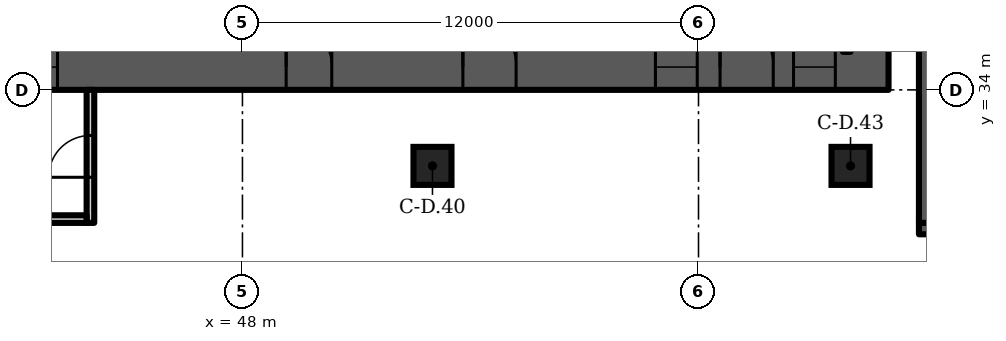
"""IFC4 building model, lengths in metres.
Left out: names, types, materials, properties, quantities, classifications, styles, units other than length and angle.
Written with IfcOpenShell. Run it as: python <this file> out.ifc"""

import sys

from ifc_helpers import new_model, si_unit, direction, frame, frame_2d, origin, origin_2d, place, context, subcontext, project, spatial, rectangle, extrude, element, fill, save


model = new_model("IFC4")
c1 = context("Model", 3, precision=1e-05, world=origin(), true_north=direction((0.0, 1.0)))
c2 = subcontext(c1, "Body", "Model", "MODEL_VIEW")
j1 = project(units=[si_unit("LENGTHUNIT", "METRE"), si_unit("PLANEANGLEUNIT", "RADIAN")], contexts=[c1])
p1 = place(None, origin())
s1 = spatial("IfcSite", under=j1, at=p1, CompositionType="ELEMENT")
p2 = place(p1, origin())
s2 = spatial("IfcBuilding", under=s1, at=p2, CompositionType="ELEMENT")
p3 = place(p2, frame((0.0, 0.0, 27.5)))
s3 = spatial("IfcBuildingStorey", under=s2, at=p3, CompositionType="ELEMENT", Elevation=27.5)
for number, where, z_axis, x_axis in (
    (1, (53.0, 32.0, 0.0), (0.0, 0.0, 1.0), (1.0, 0.0, 0.0)),
    (2, (64.0, 32.0, 0.0), (0.0, 0.0, 1.0), (1.0, 0.0, 0.0)),
):
    element("IfcColumn", number, at=place(p3, frame(where, z_axis=z_axis, x_axis=x_axis)), inside=s3, PredefinedType="COLUMN", context=c2, shape_type="SweptSolid", body=[
        extrude(rectangle(XDim=1.0, YDim=1.0, at=origin_2d()), origin(), (0.0, 0.0, 1.0), 5.5),
    ])
p4 = place(p3, frame((9.0, 34.6, 0.0), z_axis=(0.0, 0.0, 1.0), x_axis=(1.0, 0.0, 0.0)))
e3 = element("IfcWall", 3, at=p4, inside=s3, PredefinedType="SHEAR", context=c2, shape_type="SweptSolid", body=[
    extrude(rectangle(XDim=56.0, YDim=1.2, at=frame_2d((28.0, 0.0))), origin(), (0.0, 0.0, 1.0), 5.2),
])
p5 = place(p4, frame((3.3, 0.0, 0.0)))
e4 = element("IfcOpeningElement", 4, at=p5, cuts=e3, PredefinedType="OPENING", context=c2, shape_type="SweptSolid", body=[
    extrude(rectangle(XDim=1.0, YDim=2.1, at=frame_2d((0.5, 1.05))), frame((0.0, 0.61, 0.0), z_axis=(0.0, -1.0, 0.0), x_axis=(1.0, 0.0, 0.0)), (0.0, 0.0, 1.0), 1.22),
])
p6 = place(p4, frame((7.867, 0.0, 0.0)))
e5 = element("IfcOpeningElement", 5, at=p6, cuts=e3, PredefinedType="OPENING", context=c2, shape_type="SweptSolid", body=[
    extrude(rectangle(XDim=1.1, YDim=2.1, at=frame_2d((0.55, 1.05))), frame((0.0, 0.61, 0.0), z_axis=(0.0, -1.0, 0.0), x_axis=(1.0, 0.0, 0.0)), (0.0, 0.0, 1.0), 1.22),
])
p7 = place(p4, frame((12.033, 0.0, 0.0)))
e6 = element("IfcOpeningElement", 6, at=p7, cuts=e3, PredefinedType="OPENING", context=c2, shape_type="SweptSolid", body=[
    extrude(rectangle(XDim=1.1, YDim=2.1, at=frame_2d((0.55, 1.05))), frame((0.0, 0.61, 0.0), z_axis=(0.0, -1.0, 0.0), x_axis=(1.0, 0.0, 0.0)), (0.0, 0.0, 1.0), 1.22),
])
p8 = place(p4, frame((9.8, 0.0, 0.0)))
e7 = element("IfcOpeningElement", 7, at=p8, cuts=e3, PredefinedType="OPENING", context=c2, shape_type="SweptSolid", body=[
    extrude(rectangle(XDim=1.4, YDim=2.1, at=frame_2d((0.7, 1.05))), frame((0.0, 0.61, 0.0), z_axis=(0.0, -1.0, 0.0), x_axis=(1.0, 0.0, 0.0)), (0.0, 0.0, 1.0), 1.22),
])
p9 = place(p4, frame((14.65, 0.0, 0.0)))
e8 = element("IfcOpeningElement", 8, at=p9, cuts=e3, PredefinedType="OPENING", context=c2, shape_type="SweptSolid", body=[
    extrude(rectangle(XDim=1.2, YDim=2.1, at=frame_2d((0.6, 1.05))), frame((0.0, 0.61, 0.0), z_axis=(0.0, -1.0, 0.0), x_axis=(1.0, 0.0, 0.0)), (0.0, 0.0, 1.0), 1.22),
])
p10 = place(p4, frame((21.867, 0.0, 0.0)))
e9 = element("IfcOpeningElement", 9, at=p10, cuts=e3, PredefinedType="OPENING", context=c2, shape_type="SweptSolid", body=[
    extrude(rectangle(XDim=1.1, YDim=2.1, at=frame_2d((0.55, 1.05))), frame((0.0, 0.61, 0.0), z_axis=(0.0, -1.0, 0.0), x_axis=(1.0, 0.0, 0.0)), (0.0, 0.0, 1.0), 1.22),
])
p11 = place(p4, frame((26.033, 0.0, 0.0)))
e10 = element("IfcOpeningElement", 10, at=p11, cuts=e3, PredefinedType="OPENING", context=c2, shape_type="SweptSolid", body=[
    extrude(rectangle(XDim=1.1, YDim=2.1, at=frame_2d((0.55, 1.05))), frame((0.0, 0.61, 0.0), z_axis=(0.0, -1.0, 0.0), x_axis=(1.0, 0.0, 0.0)), (0.0, 0.0, 1.0), 1.22),
])
p12 = place(p4, frame((23.8, 0.0, 0.0)))
e11 = element("IfcOpeningElement", 11, at=p12, cuts=e3, PredefinedType="OPENING", context=c2, shape_type="SweptSolid", body=[
    extrude(rectangle(XDim=1.4, YDim=2.1, at=frame_2d((0.7, 1.05))), frame((0.0, 0.61, 0.0), z_axis=(0.0, -1.0, 0.0), x_axis=(1.0, 0.0, 0.0)), (0.0, 0.0, 1.0), 1.22),
])
p13 = place(p4, frame((28.867, 0.0, 0.0)))
e12 = element("IfcOpeningElement", 12, at=p13, cuts=e3, PredefinedType="OPENING", context=c2, shape_type="SweptSolid", body=[
    extrude(rectangle(XDim=1.1, YDim=2.1, at=frame_2d((0.55, 1.05))), frame((0.0, 0.61, 0.0), z_axis=(0.0, -1.0, 0.0), x_axis=(1.0, 0.0, 0.0)), (0.0, 0.0, 1.0), 1.22),
])
p14 = place(p4, frame((33.033, 0.0, 0.0)))
e13 = element("IfcOpeningElement", 13, at=p14, cuts=e3, PredefinedType="OPENING", context=c2, shape_type="SweptSolid", body=[
    extrude(rectangle(XDim=1.1, YDim=2.1, at=frame_2d((0.55, 1.05))), frame((0.0, 0.61, 0.0), z_axis=(0.0, -1.0, 0.0), x_axis=(1.0, 0.0, 0.0)), (0.0, 0.0, 1.0), 1.22),
])
p15 = place(p4, frame((40.15, 0.0, 0.0)))
e14 = element("IfcOpeningElement", 14, at=p15, cuts=e3, PredefinedType="OPENING", context=c2, shape_type="SweptSolid", body=[
    extrude(rectangle(XDim=1.2, YDim=2.1, at=frame_2d((0.6, 1.05))), frame((0.0, 0.61, 0.0), z_axis=(0.0, -1.0, 0.0), x_axis=(1.0, 0.0, 0.0)), (0.0, 0.0, 1.0), 1.22),
])
p16 = place(p4, frame((44.8, 0.0, 0.0)))
e15 = element("IfcOpeningElement", 15, at=p16, cuts=e3, PredefinedType="OPENING", context=c2, shape_type="SweptSolid", body=[
    extrude(rectangle(XDim=1.4, YDim=2.1, at=frame_2d((0.7, 1.05))), frame((0.0, 0.61, 0.0), z_axis=(0.0, -1.0, 0.0), x_axis=(1.0, 0.0, 0.0)), (0.0, 0.0, 1.0), 1.22),
])
p17 = place(p4, frame((49.867, 0.0, 0.0)))
e16 = element("IfcOpeningElement", 16, at=p17, cuts=e3, PredefinedType="OPENING", context=c2, shape_type="SweptSolid", body=[
    extrude(rectangle(XDim=1.1, YDim=2.1, at=frame_2d((0.55, 1.05))), frame((0.0, 0.61, 0.0), z_axis=(0.0, -1.0, 0.0), x_axis=(1.0, 0.0, 0.0)), (0.0, 0.0, 1.0), 1.22),
])
p18 = place(p4, frame((53.5, 0.0, 0.0)))
e17 = element("IfcOpeningElement", 17, at=p18, cuts=e3, PredefinedType="OPENING", context=c2, shape_type="SweptSolid", body=[
    extrude(rectangle(XDim=1.1, YDim=2.1, at=frame_2d((0.55, 1.05))), frame((0.0, 0.61, 0.0), z_axis=(0.0, -1.0, 0.0), x_axis=(1.0, 0.0, 0.0)), (0.0, 0.0, 1.0), 1.22),
])
p19 = place(p4, frame((51.567, 0.0, 0.0)))
e18 = element("IfcOpeningElement", 18, at=p19, cuts=e3, PredefinedType="OPENING", context=c2, shape_type="SweptSolid", body=[
    extrude(rectangle(XDim=1.4, YDim=2.1, at=frame_2d((0.7, 1.05))), frame((0.0, 0.61, 0.0), z_axis=(0.0, -1.0, 0.0), x_axis=(1.0, 0.0, 0.0)), (0.0, 0.0, 1.0), 1.22),
])
p20 = place(p3, frame((44.0, 30.5, 0.0), z_axis=(0.0, 0.0, 1.0), x_axis=(0.0, 1.0, 0.0)))
e19 = element("IfcWall", 19, at=p20, inside=s3, PredefinedType="PARTITIONING", context=c2, shape_type="SweptSolid", body=[
    extrude(rectangle(XDim=3.5, YDim=0.2, at=frame_2d((1.75, 0.0))), origin(), (0.0, 0.0, 1.0), 5.2),
])
p21 = place(p20, frame((1.2, 0.0, 0.0)))
e20 = element("IfcOpeningElement", 20, at=p21, cuts=e19, PredefinedType="OPENING", context=c2, shape_type="SweptSolid", body=[
    extrude(rectangle(XDim=1.1, YDim=2.1, at=frame_2d((0.55, 1.05))), frame((0.0, 0.11, 0.0), z_axis=(0.0, -1.0, 0.0), x_axis=(1.0, 0.0, 0.0)), (0.0, 0.0, 1.0), 0.22),
])
p22 = place(p3, frame((41.1, 30.6, 0.0), z_axis=(0.0, 0.0, 1.0), x_axis=(1.0, 0.0, 0.0)))
e21 = element("IfcWall", 21, at=p22, inside=s3, PredefinedType="PARTITIONING", context=c2, shape_type="SweptSolid", body=[
    extrude(rectangle(XDim=2.8, YDim=0.2, at=frame_2d((1.4, 0.0))), origin(), (0.0, 0.0, 1.0), 5.2),
])
p23 = place(p3, frame((65.8, 30.35, 0.0), z_axis=(0.0, 0.0, 1.0), x_axis=(1.0, 0.0, 0.0)))
e22 = element("IfcWall", 22, at=p23, inside=s3, PredefinedType="SHEAR", context=c2, shape_type="SweptSolid", body=[
    extrude(rectangle(XDim=5.55, YDim=0.3, at=frame_2d((2.775, 0.0))), origin(), (0.0, 0.0, 1.0), 5.2),
])
p24 = place(p23, frame((1.575, 0.0, 0.0)))
e23 = element("IfcOpeningElement", 23, at=p24, cuts=e22, PredefinedType="OPENING", context=c2, shape_type="SweptSolid", body=[
    extrude(rectangle(XDim=2.4, YDim=2.1, at=frame_2d((1.2, 1.05))), frame((0.0, 0.16, 0.0), z_axis=(0.0, -1.0, 0.0), x_axis=(1.0, 0.0, 0.0)), (0.0, 0.0, 1.0), 0.32),
])
p25 = place(p3, frame((65.95, 30.5, 0.0), z_axis=(0.0, 0.0, 1.0), x_axis=(0.0, 1.0, 0.0)))
e24 = element("IfcWall", 24, at=p25, inside=s3, PredefinedType="SHEAR", context=c2, shape_type="SweptSolid", body=[
    extrude(rectangle(XDim=8.4, YDim=0.3, at=frame_2d((4.2, 0.0))), origin(), (0.0, 0.0, 1.0), 5.2),
])
p26 = place(p14, origin())
e25 = element("IfcDoor", 25, at=p26, inside=s3, OperationType="DOUBLE_DOOR_SLIDING", PredefinedType="DOOR", context=c2, shape_type="SweptSolid", body=[
    extrude(rectangle(XDim=1.1, YDim=2.1, at=frame_2d((0.55, 1.05))), frame((0.0, 0.025, 0.0), z_axis=(0.0, -1.0, 0.0), x_axis=(1.0, 0.0, 0.0)), (0.0, 0.0, 1.0), 0.05),
])
fill(e13, e25)
p27 = place(p15, origin())
e26 = element("IfcDoor", 26, at=p27, inside=s3, OperationType="SINGLE_SWING_LEFT", PredefinedType="DOOR", context=c2, shape_type="SweptSolid", body=[
    extrude(rectangle(XDim=1.2, YDim=2.1, at=frame_2d((0.6, 1.05))), frame((0.0, 0.025, 0.0), z_axis=(0.0, -1.0, 0.0), x_axis=(1.0, 0.0, 0.0)), (0.0, 0.0, 1.0), 0.05),
])
fill(e14, e26)
p28 = place(p16, origin())
e27 = element("IfcDoor", 27, at=p28, inside=s3, OperationType="DOUBLE_DOOR_SINGLE_SWING", PredefinedType="DOOR", context=c2, shape_type="SweptSolid", body=[
    extrude(rectangle(XDim=1.4, YDim=2.1, at=frame_2d((0.7, 1.05))), frame((0.0, 0.025, 0.0), z_axis=(0.0, -1.0, 0.0), x_axis=(1.0, 0.0, 0.0)), (0.0, 0.0, 1.0), 0.05),
])
fill(e15, e27)
p29 = place(p17, origin())
e28 = element("IfcDoor", 28, at=p29, inside=s3, OperationType="DOUBLE_DOOR_SLIDING", PredefinedType="DOOR", context=c2, shape_type="SweptSolid", body=[
    extrude(rectangle(XDim=1.1, YDim=2.1, at=frame_2d((0.55, 1.05))), frame((0.0, 0.025, 0.0), z_axis=(0.0, -1.0, 0.0), x_axis=(1.0, 0.0, 0.0)), (0.0, 0.0, 1.0), 0.05),
])
fill(e16, e28)
p30 = place(p18, origin())
e29 = element("IfcDoor", 29, at=p30, inside=s3, OperationType="DOUBLE_DOOR_SLIDING", PredefinedType="DOOR", context=c2, shape_type="SweptSolid", body=[
    extrude(rectangle(XDim=1.1, YDim=2.1, at=frame_2d((0.55, 1.05))), frame((0.0, 0.025, 0.0), z_axis=(0.0, -1.0, 0.0), x_axis=(1.0, 0.0, 0.0)), (0.0, 0.0, 1.0), 0.05),
])
fill(e17, e29)
p31 = place(p19, origin())
e30 = element("IfcDoor", 30, at=p31, inside=s3, OperationType="DOUBLE_DOOR_SINGLE_SWING", PredefinedType="DOOR", context=c2, shape_type="SweptSolid", body=[
    extrude(rectangle(XDim=1.4, YDim=2.1, at=frame_2d((0.7, 1.05))), frame((0.0, 0.025, 0.0), z_axis=(0.0, -1.0, 0.0), x_axis=(1.0, 0.0, 0.0)), (0.0, 0.0, 1.0), 0.05),
])
fill(e18, e30)
p32 = place(p21, origin())
e31 = element("IfcDoor", 31, at=p32, inside=s3, OperationType="SINGLE_SWING_LEFT", PredefinedType="DOOR", context=c2, shape_type="SweptSolid", body=[
    extrude(rectangle(XDim=1.1, YDim=2.1, at=frame_2d((0.55, 1.05))), frame((0.0, 0.025, 0.0), z_axis=(0.0, -1.0, 0.0), x_axis=(1.0, 0.0, 0.0)), (0.0, 0.0, 1.0), 0.05),
])
fill(e20, e31)
save(model, sys.argv[1])
